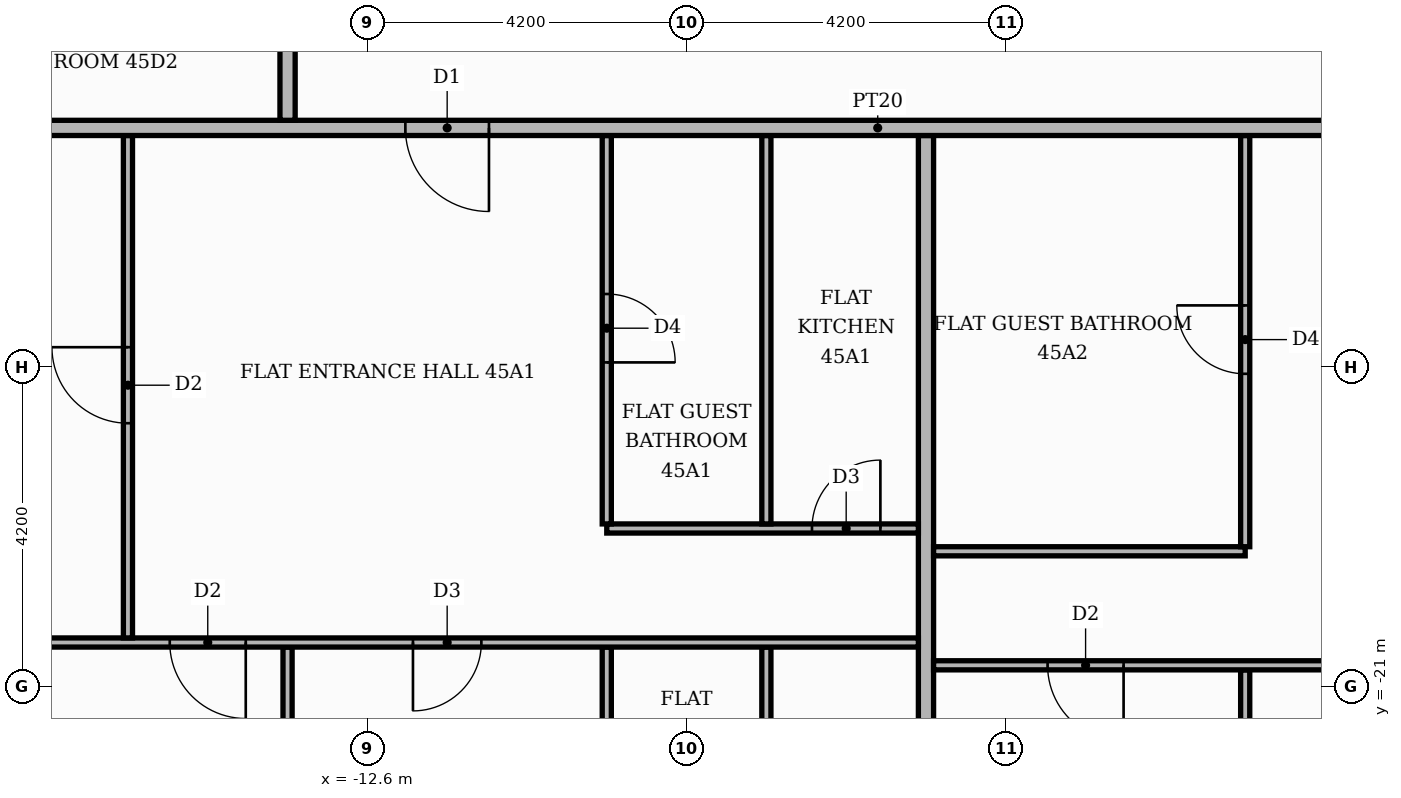
"""IFC4 building model, lengths in metres.
Left out: names, types, materials, properties, quantities, classifications, styles, units other than length and angle.
Written with IfcOpenShell. Run it as: python <this file> out.ifc"""

import sys

from ifc_helpers import new_model, si_unit, direction, frame, frame_2d, origin, place, context, subcontext, project, spatial, rectangle, extrude, element, fill, save


model = new_model("IFC4")
c1 = context("Model", 3, precision=1e-05, world=origin(), true_north=direction((0.0, 1.0)))
c2 = subcontext(c1, "Body", "Model", "MODEL_VIEW")
j1 = project(units=[si_unit("LENGTHUNIT", "METRE"), si_unit("PLANEANGLEUNIT", "RADIAN")], contexts=[c1])
p1 = place(None, origin())
s1 = spatial("IfcSite", under=j1, at=p1, CompositionType="ELEMENT")
p2 = place(p1, origin())
s2 = spatial("IfcBuilding", under=s1, at=p2, CompositionType="ELEMENT")
p3 = place(p2, frame((0.0, 0.0, 192.3)))
s3 = spatial("IfcBuildingStorey", under=s2, at=p3, CompositionType="ELEMENT", Elevation=192.3)
p4 = place(p3, frame((-13.65, -25.42, 0.0), z_axis=(0.0, 0.0, 1.0), x_axis=(0.0, 1.0, 0.0)))
e1 = element("IfcWall", 1, at=p4, inside=s3, PredefinedType="PARTITIONING", context=c2, shape_type="SweptSolid", body=[
    extrude(rectangle(XDim=4.94, YDim=0.12, at=frame_2d((2.47, 0.0))), origin(), (0.0, 0.0, 1.0), 3.48),
])
p5 = place(p3, frame((-9.45, -25.42, 0.0), z_axis=(0.0, 0.0, 1.0), x_axis=(0.0, 1.0, 0.0)))
e2 = element("IfcWall", 2, at=p5, inside=s3, PredefinedType="PARTITIONING", context=c2, shape_type="SweptSolid", body=[
    extrude(rectangle(XDim=4.94, YDim=0.12, at=frame_2d((2.47, 0.0))), origin(), (0.0, 0.0, 1.0), 3.48),
])
p6 = place(p5, frame((1.9, 0.0, 0.0)))
e3 = element("IfcOpeningElement", 3, at=p6, cuts=e2, PredefinedType="OPENING", context=c2, shape_type="SweptSolid", body=[
    extrude(rectangle(XDim=0.9, YDim=2.1, at=frame_2d((0.45, 1.05))), frame((0.0, 0.07, 0.0), z_axis=(0.0, -1.0, 0.0), x_axis=(1.0, 0.0, 0.0)), (0.0, 0.0, 1.0), 0.14),
])
p7 = place(p3, frame((-7.35, -25.42, 0.0), z_axis=(0.0, 0.0, 1.0), x_axis=(0.0, 1.0, 0.0)))
e4 = element("IfcWall", 4, at=p7, inside=s3, PredefinedType="PARTITIONING", context=c2, shape_type="SweptSolid", body=[
    extrude(rectangle(XDim=4.94, YDim=0.12, at=frame_2d((2.47, 0.0))), origin(), (0.0, 0.0, 1.0), 3.48),
])
p8 = place(p7, frame((1.9, 0.0, 0.0)))
e5 = element("IfcOpeningElement", 5, at=p8, cuts=e4, PredefinedType="OPENING", context=c2, shape_type="SweptSolid", body=[
    extrude(rectangle(XDim=0.9, YDim=2.1, at=frame_2d((0.45, 1.05))), frame((0.0, 0.07, 0.0), z_axis=(0.0, -1.0, 0.0), x_axis=(1.0, 0.0, 0.0)), (0.0, 0.0, 1.0), 0.14),
])
p9 = place(p3, frame((-5.25, -25.42, 0.0), z_axis=(0.0, 0.0, 1.0), x_axis=(0.0, 1.0, 0.0)))
e6 = element("IfcWall", 6, at=p9, inside=s3, PredefinedType="PARTITIONING", context=c2, shape_type="SweptSolid", body=[
    extrude(rectangle(XDim=11.67, YDim=0.2, at=frame_2d((5.835, 0.0))), origin(), (0.0, 0.0, 1.0), 3.48),
])
p10 = place(p3, frame((-1.05, -25.42, 0.0), z_axis=(0.0, 0.0, 1.0), x_axis=(0.0, 1.0, 0.0)))
e7 = element("IfcWall", 7, at=p10, inside=s3, PredefinedType="PARTITIONING", context=c2, shape_type="SweptSolid", body=[
    extrude(rectangle(XDim=4.64, YDim=0.12, at=frame_2d((2.32, 0.0))), origin(), (0.0, 0.0, 1.0), 3.48),
])
p11 = place(p3, frame((-5.15, -20.72, 0.0), z_axis=(0.0, 0.0, 1.0), x_axis=(1.0, 0.0, 0.0)))
e8 = element("IfcWall", 8, at=p11, inside=s3, PredefinedType="PARTITIONING", context=c2, shape_type="SweptSolid", body=[
    extrude(rectangle(XDim=18.7, YDim=0.12, at=frame_2d((9.35, 0.0))), origin(), (0.0, 0.0, 1.0), 3.48),
])
p12 = place(p11, frame((1.5, 0.0, 0.0)))
e9 = element("IfcOpeningElement", 9, at=p12, cuts=e8, PredefinedType="OPENING", context=c2, shape_type="SweptSolid", body=[
    extrude(rectangle(XDim=1.0, YDim=2.1, at=frame_2d((0.5, 1.05))), frame((0.0, 0.07, 0.0), z_axis=(0.0, -1.0, 0.0), x_axis=(1.0, 0.0, 0.0)), (0.0, 0.0, 1.0), 0.14),
])
p13 = place(p11, frame((5.75, 0.0, 0.0)))
e10 = element("IfcOpeningElement", 10, at=p13, cuts=e8, PredefinedType="OPENING", context=c2, shape_type="SweptSolid", body=[
    extrude(rectangle(XDim=0.9, YDim=2.1, at=frame_2d((0.45, 1.05))), frame((0.0, 0.07, 0.0), z_axis=(0.0, -1.0, 0.0), x_axis=(1.0, 0.0, 0.0)), (0.0, 0.0, 1.0), 0.14),
])
p14 = place(p11, frame((14.15, 0.0, 0.0)))
e11 = element("IfcOpeningElement", 11, at=p14, cuts=e8, PredefinedType="OPENING", context=c2, shape_type="SweptSolid", body=[
    extrude(rectangle(XDim=0.9, YDim=2.1, at=frame_2d((0.45, 1.05))), frame((0.0, 0.07, 0.0), z_axis=(0.0, -1.0, 0.0), x_axis=(1.0, 0.0, 0.0)), (0.0, 0.0, 1.0), 0.14),
])
p15 = place(p3, frame((-21.219, -20.42, 0.0), z_axis=(0.0, 0.0, 1.0), x_axis=(1.0, 0.0, 0.0)))
e12 = element("IfcWall", 12, at=p15, inside=s3, PredefinedType="PARTITIONING", context=c2, shape_type="SweptSolid", body=[
    extrude(rectangle(XDim=15.869, YDim=0.12, at=frame_2d((7.935, 0.0))), origin(), (0.0, 0.0, 1.0), 3.48),
])
p16 = place(p15, frame((6.019, 0.0, 0.0)))
e13 = element("IfcOpeningElement", 13, at=p16, cuts=e12, PredefinedType="OPENING", context=c2, shape_type="SweptSolid", body=[
    extrude(rectangle(XDim=1.0, YDim=2.1, at=frame_2d((0.5, 1.05))), frame((0.0, 0.07, 0.0), z_axis=(0.0, -1.0, 0.0), x_axis=(1.0, 0.0, 0.0)), (0.0, 0.0, 1.0), 0.14),
])
p17 = place(p15, frame((9.219, 0.0, 0.0)))
e14 = element("IfcOpeningElement", 14, at=p17, cuts=e12, PredefinedType="OPENING", context=c2, shape_type="SweptSolid", body=[
    extrude(rectangle(XDim=0.9, YDim=2.1, at=frame_2d((0.45, 1.05))), frame((0.0, 0.07, 0.0), z_axis=(0.0, -1.0, 0.0), x_axis=(1.0, 0.0, 0.0)), (0.0, 0.0, 1.0), 0.14),
])
p18 = place(p3, frame((-15.75, -20.36, 0.0), z_axis=(0.0, 0.0, 1.0), x_axis=(0.0, 1.0, 0.0)))
e15 = element("IfcWall", 15, at=p18, inside=s3, PredefinedType="PARTITIONING", context=c2, shape_type="SweptSolid", body=[
    extrude(rectangle(XDim=6.61, YDim=0.12, at=frame_2d((3.305, 0.0))), origin(), (0.0, 0.0, 1.0), 3.48),
])
p19 = place(p18, frame((2.825, 0.0, 0.0)))
e16 = element("IfcOpeningElement", 16, at=p19, cuts=e15, PredefinedType="OPENING", context=c2, shape_type="SweptSolid", body=[
    extrude(rectangle(XDim=1.0, YDim=2.1, at=frame_2d((0.5, 1.05))), frame((0.0, 0.07, 0.0), z_axis=(0.0, -1.0, 0.0), x_axis=(1.0, 0.0, 0.0)), (0.0, 0.0, 1.0), 0.14),
])
p20 = place(p3, frame((-5.15, -19.22, 0.0), z_axis=(0.0, 0.0, 1.0), x_axis=(1.0, 0.0, 0.0)))
e17 = element("IfcWall", 17, at=p20, inside=s3, PredefinedType="PARTITIONING", context=c2, shape_type="SweptSolid", body=[
    extrude(rectangle(XDim=4.1, YDim=0.12, at=frame_2d((2.05, 0.0))), origin(), (0.0, 0.0, 1.0), 3.48),
])
p21 = place(p3, frame((-1.05, -19.16, 0.0), z_axis=(0.0, 0.0, 1.0), x_axis=(0.0, 1.0, 0.0)))
e18 = element("IfcWall", 18, at=p21, inside=s3, PredefinedType="PARTITIONING", context=c2, shape_type="SweptSolid", body=[
    extrude(rectangle(XDim=5.41, YDim=0.12, at=frame_2d((2.705, 0.0))), origin(), (0.0, 0.0, 1.0), 3.48),
])
p22 = place(p21, frame((2.275, 0.0, 0.0)))
e19 = element("IfcOpeningElement", 19, at=p22, cuts=e18, PredefinedType="OPENING", context=c2, shape_type="SweptSolid", body=[
    extrude(rectangle(XDim=0.9, YDim=2.1, at=frame_2d((0.45, 1.05))), frame((0.0, 0.07, 0.0), z_axis=(0.0, -1.0, 0.0), x_axis=(1.0, 0.0, 0.0)), (0.0, 0.0, 1.0), 0.14),
])
p23 = place(p3, frame((-9.45, -18.92, 0.0), z_axis=(0.0, 0.0, 1.0), x_axis=(1.0, 0.0, 0.0)))
e20 = element("IfcWall", 20, at=p23, inside=s3, PredefinedType="PARTITIONING", context=c2, shape_type="SweptSolid", body=[
    extrude(rectangle(XDim=4.1, YDim=0.12, at=frame_2d((2.05, 0.0))), origin(), (0.0, 0.0, 1.0), 3.48),
])
p24 = place(p23, frame((2.7, 0.0, 0.0)))
e21 = element("IfcOpeningElement", 21, at=p24, cuts=e20, PredefinedType="OPENING", context=c2, shape_type="SweptSolid", body=[
    extrude(rectangle(XDim=0.9, YDim=2.1, at=frame_2d((0.45, 1.05))), frame((0.0, 0.07, 0.0), z_axis=(0.0, -1.0, 0.0), x_axis=(1.0, 0.0, 0.0)), (0.0, 0.0, 1.0), 0.14),
])
p25 = place(p3, frame((-9.45, -18.86, 0.0), z_axis=(0.0, 0.0, 1.0), x_axis=(0.0, 1.0, 0.0)))
e22 = element("IfcWall", 22, at=p25, inside=s3, PredefinedType="PARTITIONING", context=c2, shape_type="SweptSolid", body=[
    extrude(rectangle(XDim=5.11, YDim=0.12, at=frame_2d((2.555, 0.0))), origin(), (0.0, 0.0, 1.0), 3.48),
])
p26 = place(p25, frame((2.125, 0.0, 0.0)))
e23 = element("IfcOpeningElement", 23, at=p26, cuts=e22, PredefinedType="OPENING", context=c2, shape_type="SweptSolid", body=[
    extrude(rectangle(XDim=0.9, YDim=2.1, at=frame_2d((0.45, 1.05))), frame((0.0, 0.07, 0.0), z_axis=(0.0, -1.0, 0.0), x_axis=(1.0, 0.0, 0.0)), (0.0, 0.0, 1.0), 0.14),
])
p27 = place(p3, frame((-7.35, -18.86, 0.0), z_axis=(0.0, 0.0, 1.0), x_axis=(0.0, 1.0, 0.0)))
e24 = element("IfcWall", 24, at=p27, inside=s3, PredefinedType="PARTITIONING", context=c2, shape_type="SweptSolid", body=[
    extrude(rectangle(XDim=5.11, YDim=0.12, at=frame_2d((2.555, 0.0))), origin(), (0.0, 0.0, 1.0), 3.48),
])
p28 = place(p3, frame((-25.42, -13.65, 0.0), z_axis=(0.0, 0.0, 1.0), x_axis=(1.0, 0.0, 0.0)))
e25 = element("IfcWall", 25, at=p28, inside=s3, PredefinedType="PARTITIONING", context=c2, shape_type="SweptSolid", body=[
    extrude(rectangle(XDim=39.07, YDim=0.2, at=frame_2d((19.535, 0.0))), origin(), (0.0, 0.0, 1.0), 3.48),
])
p29 = place(p28, frame((13.32, 0.0, 0.0)))
e26 = element("IfcOpeningElement", 26, at=p29, cuts=e25, PredefinedType="OPENING", context=c2, shape_type="SweptSolid", body=[
    extrude(rectangle(XDim=1.1, YDim=2.4, at=frame_2d((0.55, 1.2))), frame((0.0, 0.11, 0.0), z_axis=(0.0, -1.0, 0.0), x_axis=(1.0, 0.0, 0.0)), (0.0, 0.0, 1.0), 0.22),
])
p30 = place(p28, frame((25.92, 0.0, 0.0)))
e27 = element("IfcOpeningElement", 27, at=p30, cuts=e25, PredefinedType="OPENING", context=c2, shape_type="SweptSolid", body=[
    extrude(rectangle(XDim=1.1, YDim=2.4, at=frame_2d((0.55, 1.2))), frame((0.0, 0.11, 0.0), z_axis=(0.0, -1.0, 0.0), x_axis=(1.0, 0.0, 0.0)), (0.0, 0.0, 1.0), 0.22),
])
p31 = place(p3, frame((-13.65, -13.55, 0.0), z_axis=(0.0, 0.0, 1.0), x_axis=(0.0, 1.0, 0.0)))
e28 = element("IfcWall", 28, at=p31, inside=s3, PredefinedType="PARTITIONING", context=c2, shape_type="SweptSolid", body=[
    extrude(rectangle(XDim=18.7, YDim=0.2, at=frame_2d((9.35, 0.0))), origin(), (0.0, 0.0, 1.0), 3.48),
])
p32 = place(p31, frame((16.15, 0.0, 0.0)))
e29 = element("IfcOpeningElement", 29, at=p32, cuts=e28, PredefinedType="OPENING", context=c2, shape_type="SweptSolid", body=[
    extrude(rectangle(XDim=1.1, YDim=2.4, at=frame_2d((0.55, 1.2))), frame((0.0, 0.11, 0.0), z_axis=(0.0, -1.0, 0.0), x_axis=(1.0, 0.0, 0.0)), (0.0, 0.0, 1.0), 0.22),
])
p33 = place(p29, frame((1.1, 0.0, 0.0), z_axis=(0.0, 0.0, 1.0), x_axis=(-1.0, 0.0, 0.0)))
e30 = element("IfcDoor", 30, at=p33, inside=s3, OperationType="SINGLE_SWING_RIGHT", PredefinedType="DOOR", context=c2, shape_type="SweptSolid", body=[
    extrude(rectangle(XDim=1.1, YDim=2.4, at=frame_2d((0.55, 1.2))), frame((0.0, 0.025, 0.0), z_axis=(0.0, -1.0, 0.0), x_axis=(1.0, 0.0, 0.0)), (0.0, 0.0, 1.0), 0.05),
])
fill(e26, e30)
p34 = place(p19, origin())
e31 = element("IfcDoor", 31, at=p34, inside=s3, OperationType="SINGLE_SWING_RIGHT", PredefinedType="DOOR", context=c2, shape_type="SweptSolid", body=[
    extrude(rectangle(XDim=1.0, YDim=2.1, at=frame_2d((0.5, 1.05))), frame((0.0, 0.025, 0.0), z_axis=(0.0, -1.0, 0.0), x_axis=(1.0, 0.0, 0.0)), (0.0, 0.0, 1.0), 0.05),
])
fill(e16, e31)
p35 = place(p26, frame((0.9, 0.0, 0.0), z_axis=(0.0, 0.0, 1.0), x_axis=(-1.0, 0.0, 0.0)))
e32 = element("IfcDoor", 32, at=p35, inside=s3, OperationType="SINGLE_SWING_LEFT", PredefinedType="DOOR", context=c2, shape_type="SweptSolid", body=[
    extrude(rectangle(XDim=0.9, YDim=2.1, at=frame_2d((0.45, 1.05))), frame((0.0, 0.025, 0.0), z_axis=(0.0, -1.0, 0.0), x_axis=(1.0, 0.0, 0.0)), (0.0, 0.0, 1.0), 0.05),
])
fill(e23, e32)
p36 = place(p24, origin())
e33 = element("IfcDoor", 33, at=p36, inside=s3, OperationType="SINGLE_SWING_RIGHT", PredefinedType="DOOR", context=c2, shape_type="SweptSolid", body=[
    extrude(rectangle(XDim=0.9, YDim=2.1, at=frame_2d((0.45, 1.05))), frame((0.0, 0.025, 0.0), z_axis=(0.0, -1.0, 0.0), x_axis=(1.0, 0.0, 0.0)), (0.0, 0.0, 1.0), 0.05),
])
fill(e21, e33)
p37 = place(p16, frame((1.0, 0.0, 0.0), z_axis=(0.0, 0.0, 1.0), x_axis=(-1.0, 0.0, 0.0)))
e34 = element("IfcDoor", 34, at=p37, inside=s3, OperationType="SINGLE_SWING_RIGHT", PredefinedType="DOOR", context=c2, shape_type="SweptSolid", body=[
    extrude(rectangle(XDim=1.0, YDim=2.1, at=frame_2d((0.5, 1.05))), frame((0.0, 0.025, 0.0), z_axis=(0.0, -1.0, 0.0), x_axis=(1.0, 0.0, 0.0)), (0.0, 0.0, 1.0), 0.05),
])
fill(e13, e34)
p38 = place(p17, frame((0.9, 0.0, 0.0), z_axis=(0.0, 0.0, 1.0), x_axis=(-1.0, 0.0, 0.0)))
e35 = element("IfcDoor", 35, at=p38, inside=s3, OperationType="SINGLE_SWING_LEFT", PredefinedType="DOOR", context=c2, shape_type="SweptSolid", body=[
    extrude(rectangle(XDim=0.9, YDim=2.1, at=frame_2d((0.45, 1.05))), frame((0.0, 0.025, 0.0), z_axis=(0.0, -1.0, 0.0), x_axis=(1.0, 0.0, 0.0)), (0.0, 0.0, 1.0), 0.05),
])
fill(e14, e35)
p39 = place(p22, origin())
e36 = element("IfcDoor", 36, at=p39, inside=s3, OperationType="SINGLE_SWING_RIGHT", PredefinedType="DOOR", context=c2, shape_type="SweptSolid", body=[
    extrude(rectangle(XDim=0.9, YDim=2.1, at=frame_2d((0.45, 1.05))), frame((0.0, 0.025, 0.0), z_axis=(0.0, -1.0, 0.0), x_axis=(1.0, 0.0, 0.0)), (0.0, 0.0, 1.0), 0.05),
])
fill(e19, e36)
p40 = place(p12, frame((1.0, 0.0, 0.0), z_axis=(0.0, 0.0, 1.0), x_axis=(-1.0, 0.0, 0.0)))
e37 = element("IfcDoor", 37, at=p40, inside=s3, OperationType="SINGLE_SWING_RIGHT", PredefinedType="DOOR", context=c2, shape_type="SweptSolid", body=[
    extrude(rectangle(XDim=1.0, YDim=2.1, at=frame_2d((0.5, 1.05))), frame((0.0, 0.025, 0.0), z_axis=(0.0, -1.0, 0.0), x_axis=(1.0, 0.0, 0.0)), (0.0, 0.0, 1.0), 0.05),
])
fill(e9, e37)
save(model, sys.argv[1])
